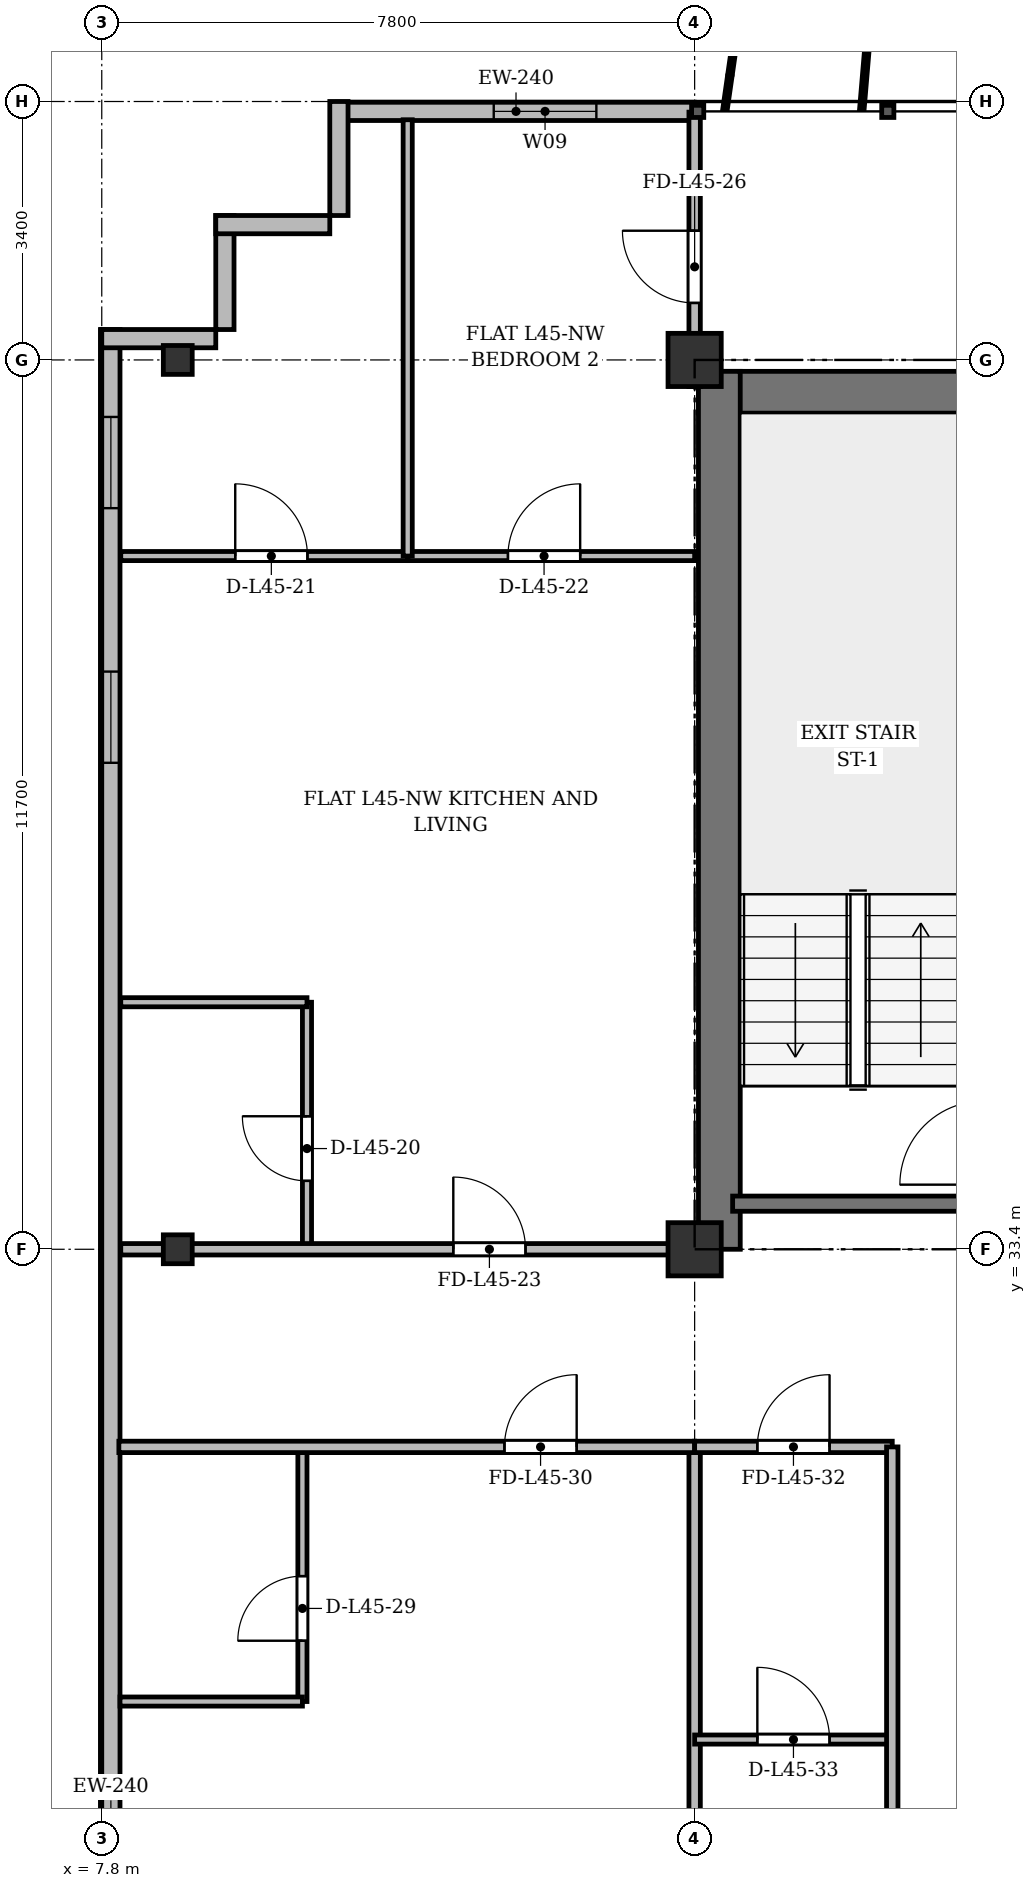
"""IFC4 building model, lengths in metres.
Left out: names, types, materials, properties, quantities, classifications, styles, units other than length and angle.
Written with IfcOpenShell. Run it as: python <this file> out.ifc"""

import sys

from ifc_helpers import new_model, si_unit, direction, frame, frame_2d, origin, origin_2d, place, context, subcontext, project, spatial, rectangle, i_section, extrude, source, transform, mapped, element, fill, save


model = new_model("IFC4")
c1 = context("Model", 3, precision=1e-05, world=origin(), true_north=direction((0.0, 1.0)))
c2 = subcontext(c1, "Body", "Model", "MODEL_VIEW")
j1 = project(units=[si_unit("LENGTHUNIT", "METRE"), si_unit("PLANEANGLEUNIT", "RADIAN")], contexts=[c1])
p1 = place(None, origin())
s1 = spatial("IfcSite", under=j1, at=p1, CompositionType="ELEMENT")
p2 = place(p1, origin())
s2 = spatial("IfcBuilding", under=s1, at=p2, CompositionType="ELEMENT")
p3 = place(p2, frame((0.0, 0.0, 171.7)))
s3 = spatial("IfcBuildingStorey", under=s2, at=p3, CompositionType="ELEMENT", Elevation=171.7)
m1 = source(origin(), c2, "Body", "SweptSolid", [
    extrude(i_section(OverallWidth=0.38, OverallDepth=0.38, WebThickness=0.02, FlangeThickness=0.03, at=origin_2d()), origin(), (0.0, 0.0, 1.0), 3.6),
])
for number, where, z_axis, x_axis in (
    (1, (8.8, 33.4, 0.0), (0.0, 0.0, 1.0), (1.0, 0.0, 0.0)),
    (2, (8.8, 45.1, 0.0), (0.0, 0.0, 1.0), (1.0, 0.0, 0.0)),
):
    element("IfcColumn", number, at=place(p3, frame(where, z_axis=z_axis, x_axis=x_axis)), inside=s3, PredefinedType="COLUMN", context=c2, shape_type="MappedRepresentation", body=[
        mapped(m1, transform((0.0, 0.0, 0.0), x_axis=(1.0, 0.0, 0.0), y_axis=(0.0, 1.0, 0.0), z_axis=(0.0, 0.0, 1.0), scale=1.0)),
    ])
m2 = source(origin(), c2, "Body", "SweptSolid", [
    extrude(rectangle(XDim=0.7, YDim=0.7, at=origin_2d()), origin(), (0.0, 0.0, 1.0), 3.6),
])
for number, where, z_axis, x_axis in (
    (3, (15.6, 33.4, 0.0), (0.0, 0.0, 1.0), (1.0, 0.0, 0.0)),
    (4, (15.6, 45.1, 0.0), (0.0, 0.0, 1.0), (1.0, 0.0, 0.0)),
):
    element("IfcColumn", number, at=place(p3, frame(where, z_axis=z_axis, x_axis=x_axis)), inside=s3, PredefinedType="COLUMN", context=c2, shape_type="MappedRepresentation", body=[
        mapped(m2, transform((0.0, 0.0, 0.0), x_axis=(1.0, 0.0, 0.0), y_axis=(0.0, 1.0, 0.0), z_axis=(0.0, 0.0, 1.0), scale=1.0)),
    ])
p4 = place(p3, frame((10.9, 48.37, 0.0), z_axis=(0.0, 0.0, 1.0), x_axis=(1.0, 0.0, 0.0)))
e5 = element("IfcWall", 5, at=p4, inside=s3, PredefinedType="SOLIDWALL", context=c2, shape_type="SweptSolid", body=[
    extrude(rectangle(XDim=4.7, YDim=0.24, at=frame_2d((2.35, 0.0))), origin(), (0.0, 0.0, 1.0), 3.35),
])
p5 = place(p4, frame((2.057, 0.0, 0.9)))
e6 = element("IfcOpeningElement", 6, at=p5, cuts=e5, PredefinedType="OPENING", context=c2, shape_type="SweptSolid", body=[
    extrude(rectangle(XDim=1.35, YDim=1.5, at=frame_2d((0.675, 0.75))), frame((0.0, 0.13, 0.0), z_axis=(0.0, -1.0, 0.0), x_axis=(1.0, 0.0, 0.0)), (0.0, 0.0, 1.0), 0.26),
])
p6 = place(p3, frame((7.92, 6.3, 0.0), z_axis=(0.0, 0.0, 1.0), x_axis=(0.0, 1.0, 0.0)))
e7 = element("IfcWall", 7, at=p6, inside=s3, PredefinedType="SOLIDWALL", context=c2, shape_type="SweptSolid", body=[
    extrude(rectangle(XDim=39.2, YDim=0.24, at=frame_2d((19.6, 0.0))), origin(), (0.0, 0.0, 1.0), 3.35),
])
p7 = place(p6, frame((1.45, 0.0, 0.92)))
e8 = element("IfcOpeningElement", 8, at=p7, cuts=e7, PredefinedType="OPENING", context=c2, shape_type="SweptSolid", body=[
    extrude(rectangle(XDim=1.2, YDim=1.65, at=frame_2d((0.6, 0.825))), frame((0.0, 0.13, 0.0), z_axis=(0.0, -1.0, 0.0), x_axis=(1.0, 0.0, 0.0)), (0.0, 0.0, 1.0), 0.26),
])
p8 = place(p6, frame((3.9, 0.0, 0.92)))
e9 = element("IfcOpeningElement", 9, at=p8, cuts=e7, PredefinedType="OPENING", context=c2, shape_type="SweptSolid", body=[
    extrude(rectangle(XDim=2.4, YDim=2.1, at=frame_2d((1.2, 1.05))), frame((0.0, 0.13, 0.0), z_axis=(0.0, -1.0, 0.0), x_axis=(1.0, 0.0, 0.0)), (0.0, 0.0, 1.0), 0.26),
])
p9 = place(p6, frame((8.1, 0.0, 0.92)))
e10 = element("IfcOpeningElement", 10, at=p9, cuts=e7, PredefinedType="OPENING", context=c2, shape_type="SweptSolid", body=[
    extrude(rectangle(XDim=2.4, YDim=2.1, at=frame_2d((1.2, 1.05))), frame((0.0, 0.13, 0.0), z_axis=(0.0, -1.0, 0.0), x_axis=(1.0, 0.0, 0.0)), (0.0, 0.0, 1.0), 0.26),
])
p10 = place(p6, frame((15.3, 0.0, 0.92)))
e11 = element("IfcOpeningElement", 11, at=p10, cuts=e7, PredefinedType="OPENING", context=c2, shape_type="SweptSolid", body=[
    extrude(rectangle(XDim=2.4, YDim=2.1, at=frame_2d((1.2, 1.05))), frame((0.0, 0.13, 0.0), z_axis=(0.0, -1.0, 0.0), x_axis=(1.0, 0.0, 0.0)), (0.0, 0.0, 1.0), 0.26),
])
p11 = place(p6, frame((33.5, 0.0, 0.92)))
e12 = element("IfcOpeningElement", 12, at=p11, cuts=e7, PredefinedType="OPENING", context=c2, shape_type="SweptSolid", body=[
    extrude(rectangle(XDim=1.2, YDim=1.65, at=frame_2d((0.6, 0.825))), frame((0.0, 0.13, 0.0), z_axis=(0.0, -1.0, 0.0), x_axis=(1.0, 0.0, 0.0)), (0.0, 0.0, 1.0), 0.26),
])
p12 = place(p6, frame((36.85, 0.0, 0.92)))
e13 = element("IfcOpeningElement", 13, at=p12, cuts=e7, PredefinedType="OPENING", context=c2, shape_type="SweptSolid", body=[
    extrude(rectangle(XDim=1.2, YDim=1.65, at=frame_2d((0.6, 0.825))), frame((0.0, 0.13, 0.0), z_axis=(0.0, -1.0, 0.0), x_axis=(1.0, 0.0, 0.0)), (0.0, 0.0, 1.0), 0.26),
])
for number, where, z_axis, x_axis in (
    (14, (7.8, 45.38, 0.0), (0.0, 0.0, 1.0), (1.0, 0.0, 0.0)),
    (15, (9.42, 45.5, 0.0), (0.0, 0.0, 1.0), (0.0, 1.0, 0.0)),
    (16, (9.3, 46.88, 0.0), (0.0, 0.0, 1.0), (1.0, 0.0, 0.0)),
    (17, (10.92, 47.0, 0.0), (0.0, 0.0, 1.0), (0.0, 1.0, 0.0)),
):
    element("IfcWall", number, at=place(p3, frame(where, z_axis=z_axis, x_axis=x_axis)), inside=s3, PredefinedType="SOLIDWALL", context=c2, shape_type="SweptSolid", body=[
        extrude(rectangle(XDim=1.5, YDim=0.24, at=frame_2d((0.75, 0.0))), origin(), (0.0, 0.0, 1.0), 3.35),
    ])
p13 = place(p3, frame((15.65, 44.675, 0.0), z_axis=(0.0, 0.0, 1.0), x_axis=(1.0, 0.0, 0.0)))
e18 = element("IfcWall", 18, at=p13, inside=s3, PredefinedType="SHEAR", context=c2, shape_type="SweptSolid", body=[
    extrude(rectangle(XDim=43.1, YDim=0.55, at=frame_2d((21.55, 0.0))), origin(), (0.0, 0.0, 1.0), 3.35),
])
p14 = place(p3, frame((15.925, 33.4, 0.0), z_axis=(0.0, 0.0, 1.0), x_axis=(0.0, 1.0, 0.0)))
e19 = element("IfcWall", 19, at=p14, inside=s3, PredefinedType="SHEAR", context=c2, shape_type="SweptSolid", body=[
    extrude(rectangle(XDim=11.55, YDim=0.55, at=frame_2d((5.775, 0.0))), origin(), (0.0, 0.0, 1.0), 3.35),
])
p15 = place(p3, frame((16.1, 34.0, 0.0), z_axis=(0.0, 0.0, 1.0), x_axis=(1.0, 0.0, 0.0)))
e20 = element("IfcWall", 20, at=p15, inside=s3, PredefinedType="SHEAR", context=c2, shape_type="SweptSolid", body=[
    extrude(rectangle(XDim=3.4, YDim=0.2, at=frame_2d((1.7, 0.0))), origin(), (0.0, 0.0, 1.0), 3.35),
])
p16 = place(p3, frame((10.5, 33.4, 0.0), z_axis=(0.0, 0.0, 1.0), x_axis=(0.0, 1.0, 0.0)))
e21 = element("IfcWall", 21, at=p16, inside=s3, PredefinedType="PARTITIONING", context=c2, shape_type="SweptSolid", body=[
    extrude(rectangle(XDim=3.25, YDim=0.12, at=frame_2d((1.625, 0.0))), origin(), (0.0, 0.0, 1.0), 2.75),
])
p17 = place(p16, frame((0.9, 0.0, 0.0)))
e22 = element("IfcOpeningElement", 22, at=p17, cuts=e21, PredefinedType="OPENING", context=c2, shape_type="SweptSolid", body=[
    extrude(rectangle(XDim=0.85, YDim=2.1, at=frame_2d((0.425, 1.05))), frame((0.0, 0.07, 0.0), z_axis=(0.0, -1.0, 0.0), x_axis=(1.0, 0.0, 0.0)), (0.0, 0.0, 1.0), 0.14),
])
p18 = place(p3, frame((8.05, 36.65, 0.0), z_axis=(0.0, 0.0, 1.0), x_axis=(1.0, 0.0, 0.0)))
e23 = element("IfcWall", 23, at=p18, inside=s3, PredefinedType="PARTITIONING", context=c2, shape_type="SweptSolid", body=[
    extrude(rectangle(XDim=2.45, YDim=0.12, at=frame_2d((1.225, 0.0))), origin(), (0.0, 0.0, 1.0), 2.85),
])
p19 = place(p3, frame((8.05, 42.52, 0.0), z_axis=(0.0, 0.0, 1.0), x_axis=(1.0, 0.0, 0.0)))
e24 = element("IfcWall", 24, at=p19, inside=s3, PredefinedType="PARTITIONING", context=c2, shape_type="SweptSolid", body=[
    extrude(rectangle(XDim=3.775, YDim=0.12, at=frame_2d((1.887, 0.0))), origin(), (0.0, 0.0, 1.0), 2.85),
])
p20 = place(p19, frame((1.506, 0.0, 0.0)))
e25 = element("IfcOpeningElement", 25, at=p20, cuts=e24, PredefinedType="OPENING", context=c2, shape_type="SweptSolid", body=[
    extrude(rectangle(XDim=0.95, YDim=2.15, at=frame_2d((0.475, 1.075))), frame((0.0, 0.07, 0.0), z_axis=(0.0, -1.0, 0.0), x_axis=(1.0, 0.0, 0.0)), (0.0, 0.0, 1.0), 0.14),
])
p21 = place(p3, frame((11.825, 42.52, 0.0), z_axis=(0.0, 0.0, 1.0), x_axis=(1.0, 0.0, 0.0)))
e26 = element("IfcWall", 26, at=p21, inside=s3, PredefinedType="PARTITIONING", context=c2, shape_type="SweptSolid", body=[
    extrude(rectangle(XDim=3.775, YDim=0.12, at=frame_2d((1.888, 0.0))), origin(), (0.0, 0.0, 1.0), 2.85),
])
p22 = place(p21, frame((1.319, 0.0, 0.0)))
e27 = element("IfcOpeningElement", 27, at=p22, cuts=e26, PredefinedType="OPENING", context=c2, shape_type="SweptSolid", body=[
    extrude(rectangle(XDim=0.95, YDim=2.15, at=frame_2d((0.475, 1.075))), frame((0.0, 0.07, 0.0), z_axis=(0.0, -1.0, 0.0), x_axis=(1.0, 0.0, 0.0)), (0.0, 0.0, 1.0), 0.14),
])
p23 = place(p3, frame((11.825, 42.52, 0.0), z_axis=(0.0, 0.0, 1.0), x_axis=(0.0, 1.0, 0.0)))
e28 = element("IfcWall", 28, at=p23, inside=s3, PredefinedType="PARTITIONING", context=c2, shape_type="SweptSolid", body=[
    extrude(rectangle(XDim=5.74, YDim=0.12, at=frame_2d((2.87, 0.0))), origin(), (0.0, 0.0, 1.0), 2.75),
])
p24 = place(p3, frame((8.05, 33.4, 0.0), z_axis=(0.0, 0.0, 1.0), x_axis=(1.0, 0.0, 0.0)))
e29 = element("IfcWall", 29, at=p24, inside=s3, PredefinedType="PARTITIONING", context=c2, shape_type="SweptSolid", body=[
    extrude(rectangle(XDim=7.55, YDim=0.15, at=frame_2d((3.775, 0.0))), origin(), (0.0, 0.0, 1.0), 2.75),
])
p25 = place(p24, frame((4.375, 0.0, 0.0)))
e30 = element("IfcOpeningElement", 30, at=p25, cuts=e29, PredefinedType="OPENING", context=c2, shape_type="SweptSolid", body=[
    extrude(rectangle(XDim=0.95, YDim=2.15, at=frame_2d((0.475, 1.075))), frame((0.0, 0.085, 0.0), z_axis=(0.0, -1.0, 0.0), x_axis=(1.0, 0.0, 0.0)), (0.0, 0.0, 1.0), 0.17),
])
p26 = place(p3, frame((15.6, 44.75, 0.0), z_axis=(0.0, 0.0, 1.0), x_axis=(0.0, 1.0, 0.0)))
e31 = element("IfcWall", 31, at=p26, inside=s3, PredefinedType="PARTITIONING", context=c2, shape_type="SweptSolid", body=[
    extrude(rectangle(XDim=3.61, YDim=0.15, at=frame_2d((1.805, 0.0))), origin(), (0.0, 0.0, 1.0), 2.85),
])
p27 = place(p26, frame((1.1, 0.0, 0.0)))
e32 = element("IfcOpeningElement", 32, at=p27, cuts=e31, PredefinedType="OPENING", context=c2, shape_type="SweptSolid", body=[
    extrude(rectangle(XDim=0.95, YDim=2.15, at=frame_2d((0.475, 1.075))), frame((0.0, 0.085, 0.0), z_axis=(0.0, -1.0, 0.0), x_axis=(1.0, 0.0, 0.0)), (0.0, 0.0, 1.0), 0.17),
])
p28 = place(p3, frame((15.6, 3.525, 0.0), z_axis=(0.0, 0.0, 1.0), x_axis=(0.0, 1.0, 0.0)))
e33 = element("IfcWall", 33, at=p28, inside=s3, PredefinedType="PARTITIONING", context=c2, shape_type="SweptSolid", body=[
    extrude(rectangle(XDim=27.275, YDim=0.15, at=frame_2d((13.638, 0.0))), origin(), (0.0, 0.0, 1.0), 2.85),
])
p29 = place(p3, frame((10.44, 27.45, 0.0), z_axis=(0.0, 0.0, 1.0), x_axis=(0.0, 1.0, 0.0)))
e34 = element("IfcWall", 34, at=p29, inside=s3, PredefinedType="PARTITIONING", context=c2, shape_type="SweptSolid", body=[
    extrude(rectangle(XDim=3.35, YDim=0.12, at=frame_2d((1.675, 0.0))), origin(), (0.0, 0.0, 1.0), 3.35),
])
p30 = place(p29, frame((0.8, 0.0, 0.0)))
e35 = element("IfcOpeningElement", 35, at=p30, cuts=e34, PredefinedType="OPENING", context=c2, shape_type="SweptSolid", body=[
    extrude(rectangle(XDim=0.85, YDim=2.1, at=frame_2d((0.425, 1.05))), frame((0.0, 0.07, 0.0), z_axis=(0.0, -1.0, 0.0), x_axis=(1.0, 0.0, 0.0)), (0.0, 0.0, 1.0), 0.14),
])
p31 = place(p3, frame((8.04, 27.45, 0.0), z_axis=(0.0, 0.0, 1.0), x_axis=(1.0, 0.0, 0.0)))
e36 = element("IfcWall", 36, at=p31, inside=s3, PredefinedType="PARTITIONING", context=c2, shape_type="SweptSolid", body=[
    extrude(rectangle(XDim=2.4, YDim=0.12, at=frame_2d((1.2, 0.0))), origin(), (0.0, 0.0, 1.0), 2.85),
])
p32 = place(p3, frame((8.025, 30.8, 0.0), z_axis=(0.0, 0.0, 1.0), x_axis=(1.0, 0.0, 0.0)))
e37 = element("IfcWall", 37, at=p32, inside=s3, PredefinedType="PARTITIONING", context=c2, shape_type="SweptSolid", body=[
    extrude(rectangle(XDim=7.575, YDim=0.15, at=frame_2d((3.788, 0.0))), origin(), (0.0, 0.0, 1.0), 2.85),
])
p33 = place(p32, frame((5.073, 0.0, 0.0)))
e38 = element("IfcOpeningElement", 38, at=p33, cuts=e37, PredefinedType="OPENING", context=c2, shape_type="SweptSolid", body=[
    extrude(rectangle(XDim=0.95, YDim=2.15, at=frame_2d((0.475, 1.075))), frame((0.0, 0.085, 0.0), z_axis=(0.0, -1.0, 0.0), x_axis=(1.0, 0.0, 0.0)), (0.0, 0.0, 1.0), 0.17),
])
p34 = place(p3, frame((15.6, 30.8, 0.0), z_axis=(0.0, 0.0, 1.0), x_axis=(1.0, 0.0, 0.0)))
e39 = element("IfcWall", 39, at=p34, inside=s3, PredefinedType="PARTITIONING", context=c2, shape_type="SweptSolid", body=[
    extrude(rectangle(XDim=2.6, YDim=0.15, at=frame_2d((1.3, 0.0))), origin(), (0.0, 0.0, 1.0), 2.85),
])
p35 = place(p34, frame((0.825, 0.0, 0.0)))
e40 = element("IfcOpeningElement", 40, at=p35, cuts=e39, PredefinedType="OPENING", context=c2, shape_type="SweptSolid", body=[
    extrude(rectangle(XDim=0.95, YDim=2.15, at=frame_2d((0.475, 1.075))), frame((0.0, 0.085, 0.0), z_axis=(0.0, -1.0, 0.0), x_axis=(1.0, 0.0, 0.0)), (0.0, 0.0, 1.0), 0.17),
])
p36 = place(p3, frame((15.6, 26.95, 0.0), z_axis=(0.0, 0.0, 1.0), x_axis=(1.0, 0.0, 0.0)))
e41 = element("IfcWall", 41, at=p36, inside=s3, PredefinedType="PARTITIONING", context=c2, shape_type="SweptSolid", body=[
    extrude(rectangle(XDim=2.6, YDim=0.12, at=frame_2d((1.3, 0.0))), origin(), (0.0, 0.0, 1.0), 2.85),
])
p37 = place(p36, frame((0.825, 0.0, 0.0)))
e42 = element("IfcOpeningElement", 42, at=p37, cuts=e41, PredefinedType="OPENING", context=c2, shape_type="SweptSolid", body=[
    extrude(rectangle(XDim=0.95, YDim=2.15, at=frame_2d((0.475, 1.075))), frame((0.0, 0.07, 0.0), z_axis=(0.0, -1.0, 0.0), x_axis=(1.0, 0.0, 0.0)), (0.0, 0.0, 1.0), 0.14),
])
p38 = place(p3, frame((18.2, 7.025, 0.0), z_axis=(0.0, 0.0, 1.0), x_axis=(0.0, 1.0, 0.0)))
e43 = element("IfcWall", 43, at=p38, inside=s3, PredefinedType="PARTITIONING", context=c2, shape_type="SweptSolid", body=[
    extrude(rectangle(XDim=23.775, YDim=0.15, at=frame_2d((11.888, 0.0))), origin(), (0.0, 0.0, 1.0), 2.75),
])
m3 = source(origin(), c2, "Body", "SweptSolid", [
    extrude(rectangle(XDim=1.35, YDim=1.5, at=frame_2d((0.675, 0.75))), frame((0.0, 0.03, 0.0), z_axis=(0.0, -1.0, 0.0), x_axis=(1.0, 0.0, 0.0)), (0.0, 0.0, 1.0), 0.06),
])
p39 = place(p5, origin())
e44 = element("IfcWindow", 44, at=p39, inside=s3, PartitioningType="SINGLE_PANEL", PredefinedType="WINDOW", context=c2, shape_type="MappedRepresentation", body=[
    mapped(m3, transform((0.0, 0.0, 0.0), x_axis=(1.0, 0.0, 0.0), y_axis=(0.0, 1.0, 0.0), z_axis=(0.0, 0.0, 1.0), scale=1.0)),
])
fill(e6, e44)
m4 = source(origin(), c2, "Body", "SweptSolid", [
    extrude(rectangle(XDim=1.2, YDim=1.65, at=frame_2d((0.6, 0.825))), frame((0.0, 0.03, 0.0), z_axis=(0.0, -1.0, 0.0), x_axis=(1.0, 0.0, 0.0)), (0.0, 0.0, 1.0), 0.06),
])
p40 = place(p11, origin())
e45 = element("IfcWindow", 45, at=p40, inside=s3, PartitioningType="SINGLE_PANEL", PredefinedType="WINDOW", context=c2, shape_type="MappedRepresentation", body=[
    mapped(m4, transform((0.0, 0.0, 0.0), x_axis=(1.0, 0.0, 0.0), y_axis=(0.0, 1.0, 0.0), z_axis=(0.0, 0.0, 1.0), scale=1.0)),
])
fill(e12, e45)
p41 = place(p12, origin())
e46 = element("IfcWindow", 46, at=p41, inside=s3, PartitioningType="SINGLE_PANEL", PredefinedType="WINDOW", context=c2, shape_type="MappedRepresentation", body=[
    mapped(m4, transform((0.0, 0.0, 0.0), x_axis=(1.0, 0.0, 0.0), y_axis=(0.0, 1.0, 0.0), z_axis=(0.0, 0.0, 1.0), scale=1.0)),
])
fill(e13, e46)
m5 = source(origin(), c2, "Body", "SweptSolid", [
    extrude(rectangle(XDim=0.85, YDim=2.1, at=frame_2d((0.425, 1.05))), frame((0.0, 0.025, 0.0), z_axis=(0.0, -1.0, 0.0), x_axis=(1.0, 0.0, 0.0)), (0.0, 0.0, 1.0), 0.05),
])
p42 = place(p17, origin())
e47 = element("IfcDoor", 47, at=p42, inside=s3, OperationType="SINGLE_SWING_RIGHT", PredefinedType="DOOR", context=c2, shape_type="MappedRepresentation", body=[
    mapped(m5, transform((0.0, 0.0, 0.0), x_axis=(1.0, 0.0, 0.0), y_axis=(0.0, 1.0, 0.0), z_axis=(0.0, 0.0, 1.0), scale=1.0)),
])
fill(e22, e47)
m6 = source(origin(), c2, "Body", "SweptSolid", [
    extrude(rectangle(XDim=0.95, YDim=2.15, at=frame_2d((0.475, 1.075))), frame((0.0, 0.025, 0.0), z_axis=(0.0, -1.0, 0.0), x_axis=(1.0, 0.0, 0.0)), (0.0, 0.0, 1.0), 0.05),
])
p43 = place(p20, origin())
e48 = element("IfcDoor", 48, at=p43, inside=s3, OperationType="SINGLE_SWING_LEFT", PredefinedType="DOOR", context=c2, shape_type="MappedRepresentation", body=[
    mapped(m6, transform((0.0, 0.0, 0.0), x_axis=(1.0, 0.0, 0.0), y_axis=(0.0, 1.0, 0.0), z_axis=(0.0, 0.0, 1.0), scale=1.0)),
])
fill(e25, e48)
p44 = place(p22, origin())
e49 = element("IfcDoor", 49, at=p44, inside=s3, OperationType="SINGLE_SWING_RIGHT", PredefinedType="DOOR", context=c2, shape_type="MappedRepresentation", body=[
    mapped(m6, transform((0.0, 0.0, 0.0), x_axis=(1.0, 0.0, 0.0), y_axis=(0.0, 1.0, 0.0), z_axis=(0.0, 0.0, 1.0), scale=1.0)),
])
fill(e27, e49)
p45 = place(p25, origin())
e50 = element("IfcDoor", 50, at=p45, inside=s3, OperationType="SINGLE_SWING_LEFT", PredefinedType="DOOR", context=c2, shape_type="MappedRepresentation", body=[
    mapped(m6, transform((0.0, 0.0, 0.0), x_axis=(1.0, 0.0, 0.0), y_axis=(0.0, 1.0, 0.0), z_axis=(0.0, 0.0, 1.0), scale=1.0)),
])
fill(e30, e50)
p46 = place(p27, origin())
e51 = element("IfcDoor", 51, at=p46, inside=s3, OperationType="SINGLE_SWING_RIGHT", PredefinedType="DOOR", context=c2, shape_type="MappedRepresentation", body=[
    mapped(m6, transform((0.0, 0.0, 0.0), x_axis=(1.0, 0.0, 0.0), y_axis=(0.0, 1.0, 0.0), z_axis=(0.0, 0.0, 1.0), scale=1.0)),
])
fill(e32, e51)
p47 = place(p30, origin())
e52 = element("IfcDoor", 52, at=p47, inside=s3, OperationType="SINGLE_SWING_LEFT", PredefinedType="DOOR", context=c2, shape_type="MappedRepresentation", body=[
    mapped(m5, transform((0.0, 0.0, 0.0), x_axis=(1.0, 0.0, 0.0), y_axis=(0.0, 1.0, 0.0), z_axis=(0.0, 0.0, 1.0), scale=1.0)),
])
fill(e35, e52)
p48 = place(p33, origin())
e53 = element("IfcDoor", 53, at=p48, inside=s3, OperationType="SINGLE_SWING_RIGHT", PredefinedType="DOOR", context=c2, shape_type="MappedRepresentation", body=[
    mapped(m6, transform((0.0, 0.0, 0.0), x_axis=(1.0, 0.0, 0.0), y_axis=(0.0, 1.0, 0.0), z_axis=(0.0, 0.0, 1.0), scale=1.0)),
])
fill(e38, e53)
p49 = place(p35, origin())
e54 = element("IfcDoor", 54, at=p49, inside=s3, OperationType="SINGLE_SWING_RIGHT", PredefinedType="DOOR", context=c2, shape_type="MappedRepresentation", body=[
    mapped(m6, transform((0.0, 0.0, 0.0), x_axis=(1.0, 0.0, 0.0), y_axis=(0.0, 1.0, 0.0), z_axis=(0.0, 0.0, 1.0), scale=1.0)),
])
fill(e40, e54)
p50 = place(p37, origin())
e55 = element("IfcDoor", 55, at=p50, inside=s3, OperationType="SINGLE_SWING_LEFT", PredefinedType="DOOR", context=c2, shape_type="MappedRepresentation", body=[
    mapped(m6, transform((0.0, 0.0, 0.0), x_axis=(1.0, 0.0, 0.0), y_axis=(0.0, 1.0, 0.0), z_axis=(0.0, 0.0, 1.0), scale=1.0)),
])
fill(e42, e55)
save(model, sys.argv[1])
